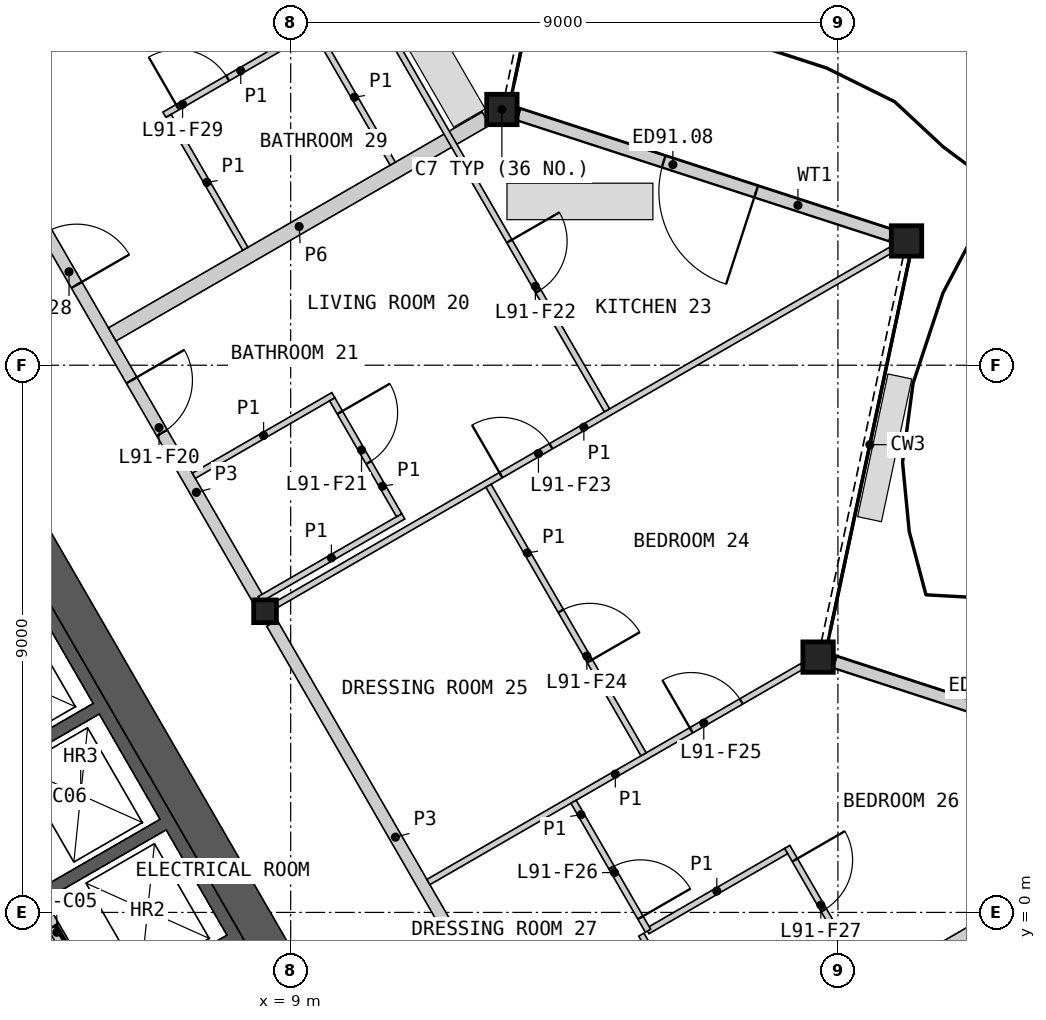
"""IFC4 building model, lengths in metres.
Left out: names, types, materials, properties, quantities, classifications, styles, units other than length and angle.
Written with IfcOpenShell. Run it as: python <this file> out.ifc"""

import sys

from ifc_helpers import new_model, si_unit, direction, frame, frame_2d, origin, origin_2d, place, context, subcontext, project, spatial, polyline, rectangle, hollow_rectangle, i_section, outline, extrude, element, fill, save


model = new_model("IFC4")
c1 = context("Model", 3, precision=1e-05, world=origin(), true_north=direction((0.0, 1.0)))
c2 = subcontext(c1, "Body", "Model", "MODEL_VIEW")
j1 = project(units=[si_unit("LENGTHUNIT", "METRE"), si_unit("PLANEANGLEUNIT", "RADIAN")], contexts=[c1])
p1 = place(None, origin())
s1 = spatial("IfcSite", under=j1, at=p1, CompositionType="ELEMENT")
p2 = place(p1, origin())
s2 = spatial("IfcBuilding", under=s1, at=p2, CompositionType="ELEMENT")
p3 = place(p2, frame((0.0, 0.0, 398.4)))
s3 = spatial("IfcBuildingStorey", under=s2, at=p3, CompositionType="ELEMENT", Elevation=398.4)
for number, where, z_axis, x_axis in (
    (1, (17.674, 4.199, 0.0), (0.0, 0.0, 1.0), (1.0, 0.0, 0.0)),
    (2, (19.129, 11.044, 0.0), (0.0, 0.0, 1.0), (1.0, 0.0, 0.0)),
    (3, (12.474, 13.206, 0.0), (0.0, 0.0, 1.0), (1.0, 0.0, 0.0)),
):
    element("IfcColumn", number, at=place(p3, frame(where, z_axis=z_axis, x_axis=x_axis)), inside=s3, PredefinedType="COLUMN", context=c2, shape_type="SweptSolid", body=[
        extrude(hollow_rectangle(XDim=0.5, YDim=0.5, WallThickness=0.03, at=origin_2d()), origin(), (0.0, 0.0, 1.0), 3.4),
    ])
p4 = place(p3, frame((8.578, 4.953, 0.0), z_axis=(0.0, 0.0, 1.0), x_axis=(1.0, 0.0, 0.0)))
e4 = element("IfcColumn", 4, at=p4, inside=s3, PredefinedType="COLUMN", context=c2, shape_type="SweptSolid", body=[
    extrude(i_section(OverallWidth=0.374, OverallDepth=0.372, WebThickness=0.016, FlangeThickness=0.026, at=origin_2d()), origin(), (0.0, 0.0, 1.0), 3.4),
])
p5 = place(p3, frame((24.074, 2.127, 0.0), z_axis=(0.0, 0.0, 1.0), x_axis=(-0.951055516513, 0.309020071371, 0.0)))
e5 = element("IfcWall", 5, at=p5, inside=s3, PredefinedType="SOLIDWALL", context=c2, shape_type="SweptSolid", body=[
    extrude(rectangle(XDim=6.44, YDim=0.2, at=frame_2d((3.22, 0.0))), origin(), (0.0, 0.0, 1.0), 2.634),
])
p6 = place(p5, frame((2.333, 0.0, 0.0)))
e6 = element("IfcOpeningElement", 6, at=p6, cuts=e5, PredefinedType="OPENING", context=c2, shape_type="SweptSolid", body=[
    extrude(rectangle(XDim=1.6, YDim=2.25, at=frame_2d((0.8, 1.125))), frame((0.0, 0.11, 0.0), z_axis=(0.0, -1.0, 0.0), x_axis=(1.0, 0.0, 0.0)), (0.0, 0.0, 1.0), 0.22),
])
p7 = place(p3, frame((18.874, 11.134, 0.0), z_axis=(0.0, 0.0, 1.0), x_axis=(-0.951063037463, 0.308996923563, 0.0)))
e7 = element("IfcWall", 7, at=p7, inside=s3, PredefinedType="SOLIDWALL", context=c2, shape_type="SweptSolid", body=[
    extrude(rectangle(XDim=6.44, YDim=0.2, at=frame_2d((3.22, 0.0))), origin(), (0.0, 0.0, 1.0), 2.634),
])
p8 = place(p7, frame((2.333, 0.0, 0.0)))
e8 = element("IfcOpeningElement", 8, at=p8, cuts=e7, PredefinedType="OPENING", context=c2, shape_type="SweptSolid", body=[
    extrude(rectangle(XDim=1.6, YDim=2.25, at=frame_2d((0.8, 1.125))), frame((0.0, 0.11, 0.0), z_axis=(0.0, -1.0, 0.0), x_axis=(1.0, 0.0, 0.0)), (0.0, 0.0, 1.0), 0.22),
])
p9 = place(p3, origin())
e9 = element("IfcWall", 9, at=p9, inside=s3, PredefinedType="SHEAR", context=c2, shape_type="SweptSolid", body=[
    extrude(outline(polyline([(1.561, 6.097), (3.731, 7.35), (8.231, -0.444), (6.061, -1.697), (5.96, -1.524), (7.952, -0.374), (6.952, 1.358), (4.96, 0.208), (4.861, 0.381), (6.852, 1.531), (5.852, 3.263), (3.861, 2.113), (3.76, 2.287), (5.752, 3.437), (4.752, 5.169), (2.76, 4.019), (2.66, 4.192), (4.652, 5.342), (3.652, 7.074), (1.66, 5.924), (1.561, 6.097)])), origin(), (0.0, 0.0, 1.0), 3.1),
])
p10 = place(p3, frame((5.817, -1.476, 0.0), z_axis=(0.0, 0.0, 1.0), x_axis=(-0.500002616675, 0.866023893041, 0.0)))
e10 = element("IfcWall", 10, at=p10, inside=s3, PredefinedType="SOLIDWALL", context=c2, shape_type="SweptSolid", body=[
    extrude(rectangle(XDim=8.373, YDim=0.2, at=frame_2d((4.187, 0.0))), origin(), (0.0, 0.0, 1.0), 3.1),
])
p11 = place(p10, frame((0.337, 0.0, 0.0)))
e11 = element("IfcOpeningElement", 11, at=p11, cuts=e10, PredefinedType="OPENING", context=c2, shape_type="SweptSolid", body=[
    extrude(rectangle(XDim=1.1, YDim=2.1, at=frame_2d((0.55, 1.05))), frame((0.0, 0.11, 0.0), z_axis=(0.0, -1.0, 0.0), x_axis=(1.0, 0.0, 0.0)), (0.0, 0.0, 1.0), 0.22),
])
p12 = place(p10, frame((2.537, 0.0, 0.0)))
e12 = element("IfcOpeningElement", 12, at=p12, cuts=e10, PredefinedType="OPENING", context=c2, shape_type="SweptSolid", body=[
    extrude(rectangle(XDim=1.1, YDim=2.1, at=frame_2d((0.55, 1.05))), frame((0.0, 0.11, 0.0), z_axis=(0.0, -1.0, 0.0), x_axis=(1.0, 0.0, 0.0)), (0.0, 0.0, 1.0), 0.22),
])
p13 = place(p10, frame((4.737, 0.0, 0.0)))
e13 = element("IfcOpeningElement", 13, at=p13, cuts=e10, PredefinedType="OPENING", context=c2, shape_type="SweptSolid", body=[
    extrude(rectangle(XDim=1.1, YDim=2.1, at=frame_2d((0.55, 1.05))), frame((0.0, 0.11, 0.0), z_axis=(0.0, -1.0, 0.0), x_axis=(1.0, 0.0, 0.0)), (0.0, 0.0, 1.0), 0.22),
])
p14 = place(p10, frame((7.037, 0.0, 0.0)))
e14 = element("IfcOpeningElement", 14, at=p14, cuts=e10, PredefinedType="OPENING", context=c2, shape_type="SweptSolid", body=[
    extrude(rectangle(XDim=0.9, YDim=2.1, at=frame_2d((0.45, 1.05))), frame((0.0, 0.11, 0.0), z_axis=(0.0, -1.0, 0.0), x_axis=(1.0, 0.0, 0.0)), (0.0, 0.0, 1.0), 0.22),
])
p15 = place(p3, frame((8.686, -0.634, 0.0), z_axis=(0.0, 0.0, 1.0), x_axis=(-0.500004601921, 0.866022746848, 0.0)))
e15 = element("IfcWall", 15, at=p15, inside=s3, PredefinedType="SHEAR", context=c2, shape_type="SweptSolid", body=[
    extrude(rectangle(XDim=16.853, YDim=0.6, at=frame_2d((8.426, 0.0))), origin(), (0.0, 0.0, 1.0), 3.1),
])
p16 = place(p3, frame((8.692, 4.756, 0.0), z_axis=(0.0, 0.0, 1.0), x_axis=(0.500001682468, -0.866024432409, 0.0)))
e16 = element("IfcWall", 16, at=p16, inside=s3, PredefinedType="PARTITIONING", context=c2, shape_type="SweptSolid", body=[
    extrude(rectangle(XDim=8.124, YDim=0.2, at=frame_2d((4.062, 0.0))), origin(), (0.0, 0.0, 1.0), 3.1),
])
p17 = place(p3, frame((4.403, 12.185, 0.0), z_axis=(0.0, 0.0, 1.0), x_axis=(0.499992155518, -0.866029932751, 0.0)))
e17 = element("IfcWall", 17, at=p17, inside=s3, PredefinedType="PARTITIONING", context=c2, shape_type="SweptSolid", body=[
    extrude(rectangle(XDim=8.123, YDim=0.2, at=frame_2d((4.062, 0.0))), origin(), (0.0, 0.0, 1.0), 3.1),
])
p18 = place(p17, frame((3.963, 0.0, 0.0)))
e18 = element("IfcOpeningElement", 18, at=p18, cuts=e17, PredefinedType="OPENING", context=c2, shape_type="SweptSolid", body=[
    extrude(rectangle(XDim=1.0, YDim=2.1, at=frame_2d((0.5, 1.05))), frame((0.0, 0.11, 0.0), z_axis=(0.0, -1.0, 0.0), x_axis=(1.0, 0.0, 0.0)), (0.0, 0.0, 1.0), 0.22),
])
p19 = place(p17, frame((1.153, 0.0, 0.0)))
e19 = element("IfcOpeningElement", 19, at=p19, cuts=e17, PredefinedType="OPENING", context=c2, shape_type="SweptSolid", body=[
    extrude(rectangle(XDim=1.0, YDim=2.1, at=frame_2d((0.5, 1.05))), frame((0.0, 0.11, 0.0), z_axis=(0.0, -1.0, 0.0), x_axis=(1.0, 0.0, 0.0)), (0.0, 0.0, 1.0), 0.22),
])
p20 = place(p3, frame((6.065, 9.506, 0.0), z_axis=(0.0, 0.0, 1.0), x_axis=(0.866018949465, 0.500011179042, 0.0)))
e20 = element("IfcWall", 20, at=p20, inside=s3, PredefinedType="PARTITIONING", context=c2, shape_type="SweptSolid", body=[
    extrude(rectangle(XDim=7.1, YDim=0.25, at=frame_2d((3.55, 0.0))), origin(), (0.0, 0.0, 1.0), 2.33),
])
p21 = place(p3, frame((18.585, -1.279, 0.0), z_axis=(0.0, 0.0, 1.0), x_axis=(0.866023139795, 0.500003921324, 0.0)))
e21 = element("IfcWall", 21, at=p21, inside=s3, PredefinedType="PARTITIONING", context=c2, shape_type="SweptSolid", body=[
    extrude(rectangle(XDim=6.332, YDim=0.25, at=frame_2d((3.166, 0.0))), origin(), (0.0, 0.0, 1.0), 2.33),
])
p22 = place(p3, frame((3.465, 14.01, 0.0), z_axis=(0.0, 0.0, 1.0), x_axis=(0.866032376801, 0.499987922186, 0.0)))
e22 = element("IfcWall", 22, at=p22, inside=s3, PredefinedType="PARTITIONING", context=c2, shape_type="SweptSolid", body=[
    extrude(rectangle(XDim=11.782, YDim=0.1, at=frame_2d((5.891, 0.0))), origin(), (0.0, 0.0, 1.0), 2.33),
])
p23 = place(p22, frame((7.171, 0.0, 0.0)))
e23 = element("IfcOpeningElement", 23, at=p23, cuts=e22, PredefinedType="OPENING", context=c2, shape_type="SweptSolid", body=[
    extrude(rectangle(XDim=0.95, YDim=2.1, at=frame_2d((0.475, 1.05))), frame((0.0, 0.06, 0.0), z_axis=(0.0, -1.0, 0.0), x_axis=(1.0, 0.0, 0.0)), (0.0, 0.0, 1.0), 0.12),
])
p24 = place(p3, frame((8.775, 5.066, 0.0), z_axis=(0.0, 0.0, 1.0), x_axis=(0.866023724155, 0.500002909193, 0.0)))
e24 = element("IfcWall", 24, at=p24, inside=s3, PredefinedType="PARTITIONING", context=c2, shape_type="SweptSolid", body=[
    extrude(rectangle(XDim=11.655, YDim=0.1, at=frame_2d((5.827, 0.0))), origin(), (0.0, 0.0, 1.0), 2.33),
])
p25 = place(p24, frame((4.252, 0.0, 0.0)))
e25 = element("IfcOpeningElement", 25, at=p25, cuts=e24, PredefinedType="OPENING", context=c2, shape_type="SweptSolid", body=[
    extrude(rectangle(XDim=0.95, YDim=2.1, at=frame_2d((0.475, 1.05))), frame((0.0, 0.06, 0.0), z_axis=(0.0, -1.0, 0.0), x_axis=(1.0, 0.0, 0.0)), (0.0, 0.0, 1.0), 0.12),
])
p26 = place(p3, frame((9.052, 17.177, 0.0), z_axis=(0.0, 0.0, 1.0), x_axis=(0.499998765615, -0.866026116456, 0.0)))
e26 = element("IfcWall", 26, at=p26, inside=s3, PredefinedType="PARTITIONING", context=c2, shape_type="SweptSolid", body=[
    extrude(rectangle(XDim=10.3, YDim=0.1, at=frame_2d((5.15, 0.0))), origin(), (0.0, 0.0, 1.0), 2.33),
])
p27 = place(p26, frame((7.089, 0.0, 0.0)))
e27 = element("IfcOpeningElement", 27, at=p27, cuts=e26, PredefinedType="OPENING", context=c2, shape_type="SweptSolid", body=[
    extrude(rectangle(XDim=0.95, YDim=2.1, at=frame_2d((0.475, 1.05))), frame((0.0, 0.06, 0.0), z_axis=(0.0, -1.0, 0.0), x_axis=(1.0, 0.0, 0.0)), (0.0, 0.0, 1.0), 0.12),
])
p28 = place(p26, frame((0.954, 0.0, 0.0)))
e28 = element("IfcOpeningElement", 28, at=p28, cuts=e26, PredefinedType="OPENING", context=c2, shape_type="SweptSolid", body=[
    extrude(rectangle(XDim=0.95, YDim=2.1, at=frame_2d((0.475, 1.05))), frame((0.0, 0.06, 0.0), z_axis=(0.0, -1.0, 0.0), x_axis=(1.0, 0.0, 0.0)), (0.0, 0.0, 1.0), 0.12),
])
p29 = place(p3, frame((11.265, 0.5, 0.0), z_axis=(0.0, 0.0, 1.0), x_axis=(0.866033839264, 0.499985389037, 0.0)))
e29 = element("IfcWall", 29, at=p29, inside=s3, PredefinedType="PARTITIONING", context=c2, shape_type="SweptSolid", body=[
    extrude(rectangle(XDim=7.1, YDim=0.1, at=frame_2d((3.55, 0.0))), origin(), (0.0, 0.0, 1.0), 2.33),
])
p30 = place(p29, frame((4.992, 0.0, 0.0)))
e30 = element("IfcOpeningElement", 30, at=p30, cuts=e29, PredefinedType="OPENING", context=c2, shape_type="SweptSolid", body=[
    extrude(rectangle(XDim=0.95, YDim=2.1, at=frame_2d((0.475, 1.05))), frame((0.0, 0.06, 0.0), z_axis=(0.0, -1.0, 0.0), x_axis=(1.0, 0.0, 0.0)), (0.0, 0.0, 1.0), 0.12),
])
p31 = place(p3, frame((14.767, -0.365, 0.0), z_axis=(0.0, 0.0, 1.0), x_axis=(0.500002931134, -0.866023711487, 0.0)))
e31 = element("IfcWall", 31, at=p31, inside=s3, PredefinedType="PARTITIONING", context=c2, shape_type="SweptSolid", body=[
    extrude(rectangle(XDim=5.45, YDim=0.1, at=frame_2d((2.725, 0.0))), origin(), (0.0, 0.0, 1.0), 2.33),
])
p32 = place(p3, frame((17.167, 1.078, 0.0), z_axis=(0.0, 0.0, 1.0), x_axis=(0.499996545922, -0.866027397988, 0.0)))
e32 = element("IfcWall", 32, at=p32, inside=s3, PredefinedType="PARTITIONING", context=c2, shape_type="SweptSolid", body=[
    extrude(rectangle(XDim=5.5, YDim=0.1, at=frame_2d((2.75, 0.0))), origin(), (0.0, 0.0, 1.0), 2.33),
])
p33 = place(p32, frame((4.199, 0.0, 0.0)))
e33 = element("IfcOpeningElement", 33, at=p33, cuts=e32, PredefinedType="OPENING", context=c2, shape_type="SweptSolid", body=[
    extrude(rectangle(XDim=0.95, YDim=2.1, at=frame_2d((0.475, 1.05))), frame((0.0, 0.06, 0.0), z_axis=(0.0, -1.0, 0.0), x_axis=(1.0, 0.0, 0.0)), (0.0, 0.0, 1.0), 0.12),
])
p34 = place(p32, frame((0.25, 0.0, 0.0)))
e34 = element("IfcOpeningElement", 34, at=p34, cuts=e32, PredefinedType="OPENING", context=c2, shape_type="SweptSolid", body=[
    extrude(rectangle(XDim=0.95, YDim=2.1, at=frame_2d((0.475, 1.05))), frame((0.0, 0.06, 0.0), z_axis=(0.0, -1.0, 0.0), x_axis=(1.0, 0.0, 0.0)), (0.0, 0.0, 1.0), 0.12),
])
p35 = place(p3, frame((12.254, 7.017, 0.0), z_axis=(0.0, 0.0, 1.0), x_axis=(0.500005610874, -0.86602216432, 0.0)))
e35 = element("IfcWall", 35, at=p35, inside=s3, PredefinedType="PARTITIONING", context=c2, shape_type="SweptSolid", body=[
    extrude(rectangle(XDim=5.1, YDim=0.1, at=frame_2d((2.55, 0.0))), origin(), (0.0, 0.0, 1.0), 2.33),
])
p36 = place(p35, frame((2.379, 0.0, 0.0)))
e36 = element("IfcOpeningElement", 36, at=p36, cuts=e35, PredefinedType="OPENING", context=c2, shape_type="SweptSolid", body=[
    extrude(rectangle(XDim=0.95, YDim=2.1, at=frame_2d((0.475, 1.05))), frame((0.0, 0.06, 0.0), z_axis=(0.0, -1.0, 0.0), x_axis=(1.0, 0.0, 0.0)), (0.0, 0.0, 1.0), 0.12),
])
p37 = place(p3, frame((6.923, 13.119, 0.0), z_axis=(0.0, 0.0, 1.0), x_axis=(0.866032775405, 0.499987231761, 0.0)))
e37 = element("IfcWall", 37, at=p37, inside=s3, PredefinedType="PARTITIONING", context=c2, shape_type="SweptSolid", body=[
    extrude(rectangle(XDim=2.9, YDim=0.1, at=frame_2d((1.45, 0.0))), origin(), (0.0, 0.0, 1.0), 2.33),
])
p38 = place(p37, frame((0.25, 0.0, 0.0)))
e38 = element("IfcOpeningElement", 38, at=p38, cuts=e37, PredefinedType="OPENING", context=c2, shape_type="SweptSolid", body=[
    extrude(rectangle(XDim=0.95, YDim=2.1, at=frame_2d((0.475, 1.05))), frame((0.0, 0.06, 0.0), z_axis=(0.0, -1.0, 0.0), x_axis=(1.0, 0.0, 0.0)), (0.0, 0.0, 1.0), 0.12),
])
p39 = place(p3, frame((7.407, 7.182, 0.0), z_axis=(0.0, 0.0, 1.0), x_axis=(0.866052124492, 0.499953715521, 0.0)))
e39 = element("IfcWall", 39, at=p39, inside=s3, PredefinedType="PARTITIONING", context=c2, shape_type="SweptSolid", body=[
    extrude(rectangle(XDim=2.65, YDim=0.1, at=frame_2d((1.325, 0.0))), origin(), (0.0, 0.0, 1.0), 2.33),
])
p40 = place(p3, frame((9.417, 14.501, 0.0), z_axis=(0.0, 0.0, 1.0), x_axis=(0.500048846702, -0.865997200291, 0.0)))
e40 = element("IfcWall", 40, at=p40, inside=s3, PredefinedType="PARTITIONING", context=c2, shape_type="SweptSolid", body=[
    extrude(rectangle(XDim=2.525, YDim=0.1, at=frame_2d((1.263, 0.0))), origin(), (0.0, 0.0, 1.0), 2.33),
])
p41 = place(p3, frame((6.992, 13.101, 0.0), z_axis=(0.0, 0.0, 1.0), x_axis=(0.499976333282, -0.866039067339, 0.0)))
e41 = element("IfcWall", 41, at=p41, inside=s3, PredefinedType="PARTITIONING", context=c2, shape_type="SweptSolid", body=[
    extrude(rectangle(XDim=2.525, YDim=0.1, at=frame_2d((1.262, 0.0))), origin(), (0.0, 0.0, 1.0), 2.33),
])
p42 = place(p3, frame((14.868, -0.307, 0.0), z_axis=(0.0, 0.0, 1.0), x_axis=(0.865997164422, 0.50004890882, 0.0)))
e42 = element("IfcWall", 42, at=p42, inside=s3, PredefinedType="PARTITIONING", context=c2, shape_type="SweptSolid", body=[
    extrude(rectangle(XDim=2.633, YDim=0.1, at=frame_2d((1.316, 0.0))), origin(), (0.0, 0.0, 1.0), 2.33),
])
p43 = place(p3, frame((8.488, 5.15, 0.0), z_axis=(0.0, 0.0, 1.0), x_axis=(0.866027727466, 0.499995975244, 0.0)))
e43 = element("IfcWall", 43, at=p43, inside=s3, PredefinedType="PARTITIONING", context=c2, shape_type="SweptSolid", body=[
    extrude(rectangle(XDim=2.73, YDim=0.1, at=frame_2d((1.365, 0.0))), origin(), (0.0, 0.0, 1.0), 2.33),
])
p44 = place(p3, frame((13.652, 1.82, 0.0), z_axis=(0.0, 0.0, 1.0), x_axis=(0.500018594424, -0.866014668023, 0.0)))
e44 = element("IfcWall", 44, at=p44, inside=s3, PredefinedType="PARTITIONING", context=c2, shape_type="SweptSolid", body=[
    extrude(rectangle(XDim=2.45, YDim=0.1, at=frame_2d((1.225, 0.0))), origin(), (0.0, 0.0, 1.0), 2.33),
])
p45 = place(p44, frame((1.25, 0.0, 0.0)))
e45 = element("IfcOpeningElement", 45, at=p45, cuts=e44, PredefinedType="OPENING", context=c2, shape_type="SweptSolid", body=[
    extrude(rectangle(XDim=0.95, YDim=2.1, at=frame_2d((0.475, 1.05))), frame((0.0, 0.06, 0.0), z_axis=(0.0, -1.0, 0.0), x_axis=(1.0, 0.0, 0.0)), (0.0, 0.0, 1.0), 0.12),
])
p46 = place(p3, frame((9.684, 8.438, 0.0), z_axis=(0.0, 0.0, 1.0), x_axis=(0.499994660107, -0.866028486751, 0.0)))
e46 = element("IfcWall", 46, at=p46, inside=s3, PredefinedType="PARTITIONING", context=c2, shape_type="SweptSolid", body=[
    extrude(rectangle(XDim=2.2, YDim=0.1, at=frame_2d((1.1, 0.0))), origin(), (0.0, 0.0, 1.0), 2.33),
])
p47 = place(p46, frame((0.25, 0.0, 0.0)))
e47 = element("IfcOpeningElement", 47, at=p47, cuts=e46, PredefinedType="OPENING", context=c2, shape_type="SweptSolid", body=[
    extrude(rectangle(XDim=0.95, YDim=2.1, at=frame_2d((0.475, 1.05))), frame((0.0, 0.06, 0.0), z_axis=(0.0, -1.0, 0.0), x_axis=(1.0, 0.0, 0.0)), (0.0, 0.0, 1.0), 0.12),
])
p48 = place(p8, origin())
e48 = element("IfcDoor", 48, at=p48, inside=s3, OperationType="DOUBLE_DOOR_SINGLE_SWING", PredefinedType="DOOR", context=c2, shape_type="SweptSolid", body=[
    extrude(rectangle(XDim=1.6, YDim=2.25, at=frame_2d((0.8, 1.125))), frame((0.0, 0.025, 0.0), z_axis=(0.0, -1.0, 0.0), x_axis=(1.0, 0.0, 0.0)), (0.0, 0.0, 1.0), 0.05),
])
fill(e8, e48)
p49 = place(p11, origin())
e49 = element("IfcDoor", 49, at=p49, inside=s3, OperationType="SLIDING_TO_LEFT", PredefinedType="DOOR", context=c2, shape_type="SweptSolid", body=[
    extrude(rectangle(XDim=1.1, YDim=2.1, at=frame_2d((0.55, 1.05))), frame((0.0, 0.025, 0.0), z_axis=(0.0, -1.0, 0.0), x_axis=(1.0, 0.0, 0.0)), (0.0, 0.0, 1.0), 0.05),
])
fill(e11, e49)
p50 = place(p18, origin())
e50 = element("IfcDoor", 50, at=p50, inside=s3, OperationType="SINGLE_SWING_LEFT", PredefinedType="DOOR", context=c2, shape_type="SweptSolid", body=[
    extrude(rectangle(XDim=1.0, YDim=2.1, at=frame_2d((0.5, 1.05))), frame((0.0, 0.025, 0.0), z_axis=(0.0, -1.0, 0.0), x_axis=(1.0, 0.0, 0.0)), (0.0, 0.0, 1.0), 0.05),
])
fill(e18, e50)
p51 = place(p47, origin())
e51 = element("IfcDoor", 51, at=p51, inside=s3, OperationType="SINGLE_SWING_LEFT", PredefinedType="DOOR", context=c2, shape_type="SweptSolid", body=[
    extrude(rectangle(XDim=0.95, YDim=2.1, at=frame_2d((0.475, 1.05))), frame((0.0, 0.025, 0.0), z_axis=(0.0, -1.0, 0.0), x_axis=(1.0, 0.0, 0.0)), (0.0, 0.0, 1.0), 0.05),
])
fill(e47, e51)
p52 = place(p27, origin())
e52 = element("IfcDoor", 52, at=p52, inside=s3, OperationType="SINGLE_SWING_LEFT", PredefinedType="DOOR", context=c2, shape_type="SweptSolid", body=[
    extrude(rectangle(XDim=0.95, YDim=2.1, at=frame_2d((0.475, 1.05))), frame((0.0, 0.025, 0.0), z_axis=(0.0, -1.0, 0.0), x_axis=(1.0, 0.0, 0.0)), (0.0, 0.0, 1.0), 0.05),
])
fill(e27, e52)
p53 = place(p25, origin())
e53 = element("IfcDoor", 53, at=p53, inside=s3, OperationType="SINGLE_SWING_LEFT", PredefinedType="DOOR", context=c2, shape_type="SweptSolid", body=[
    extrude(rectangle(XDim=0.95, YDim=2.1, at=frame_2d((0.475, 1.05))), frame((0.0, 0.025, 0.0), z_axis=(0.0, -1.0, 0.0), x_axis=(1.0, 0.0, 0.0)), (0.0, 0.0, 1.0), 0.05),
])
fill(e25, e53)
p54 = place(p36, origin())
e54 = element("IfcDoor", 54, at=p54, inside=s3, OperationType="SINGLE_SWING_RIGHT", PredefinedType="DOOR", context=c2, shape_type="SweptSolid", body=[
    extrude(rectangle(XDim=0.95, YDim=2.1, at=frame_2d((0.475, 1.05))), frame((0.0, 0.025, 0.0), z_axis=(0.0, -1.0, 0.0), x_axis=(1.0, 0.0, 0.0)), (0.0, 0.0, 1.0), 0.05),
])
fill(e36, e54)
p55 = place(p30, origin())
e55 = element("IfcDoor", 55, at=p55, inside=s3, OperationType="SINGLE_SWING_LEFT", PredefinedType="DOOR", context=c2, shape_type="SweptSolid", body=[
    extrude(rectangle(XDim=0.95, YDim=2.1, at=frame_2d((0.475, 1.05))), frame((0.0, 0.025, 0.0), z_axis=(0.0, -1.0, 0.0), x_axis=(1.0, 0.0, 0.0)), (0.0, 0.0, 1.0), 0.05),
])
fill(e30, e55)
p56 = place(p45, origin())
e56 = element("IfcDoor", 56, at=p56, inside=s3, OperationType="SINGLE_SWING_RIGHT", PredefinedType="DOOR", context=c2, shape_type="SweptSolid", body=[
    extrude(rectangle(XDim=0.95, YDim=2.1, at=frame_2d((0.475, 1.05))), frame((0.0, 0.025, 0.0), z_axis=(0.0, -1.0, 0.0), x_axis=(1.0, 0.0, 0.0)), (0.0, 0.0, 1.0), 0.05),
])
fill(e45, e56)
p57 = place(p34, origin())
e57 = element("IfcDoor", 57, at=p57, inside=s3, OperationType="SINGLE_SWING_LEFT", PredefinedType="DOOR", context=c2, shape_type="SweptSolid", body=[
    extrude(rectangle(XDim=0.95, YDim=2.1, at=frame_2d((0.475, 1.05))), frame((0.0, 0.025, 0.0), z_axis=(0.0, -1.0, 0.0), x_axis=(1.0, 0.0, 0.0)), (0.0, 0.0, 1.0), 0.05),
])
fill(e34, e57)
p58 = place(p19, origin())
e58 = element("IfcDoor", 58, at=p58, inside=s3, OperationType="SINGLE_SWING_RIGHT", PredefinedType="DOOR", context=c2, shape_type="SweptSolid", body=[
    extrude(rectangle(XDim=1.0, YDim=2.1, at=frame_2d((0.5, 1.05))), frame((0.0, 0.025, 0.0), z_axis=(0.0, -1.0, 0.0), x_axis=(1.0, 0.0, 0.0)), (0.0, 0.0, 1.0), 0.05),
])
fill(e19, e58)
p59 = place(p38, origin())
e59 = element("IfcDoor", 59, at=p59, inside=s3, OperationType="SINGLE_SWING_LEFT", PredefinedType="DOOR", context=c2, shape_type="SweptSolid", body=[
    extrude(rectangle(XDim=0.95, YDim=2.1, at=frame_2d((0.475, 1.05))), frame((0.0, 0.025, 0.0), z_axis=(0.0, -1.0, 0.0), x_axis=(1.0, 0.0, 0.0)), (0.0, 0.0, 1.0), 0.05),
])
fill(e38, e59)
save(model, sys.argv[1])
